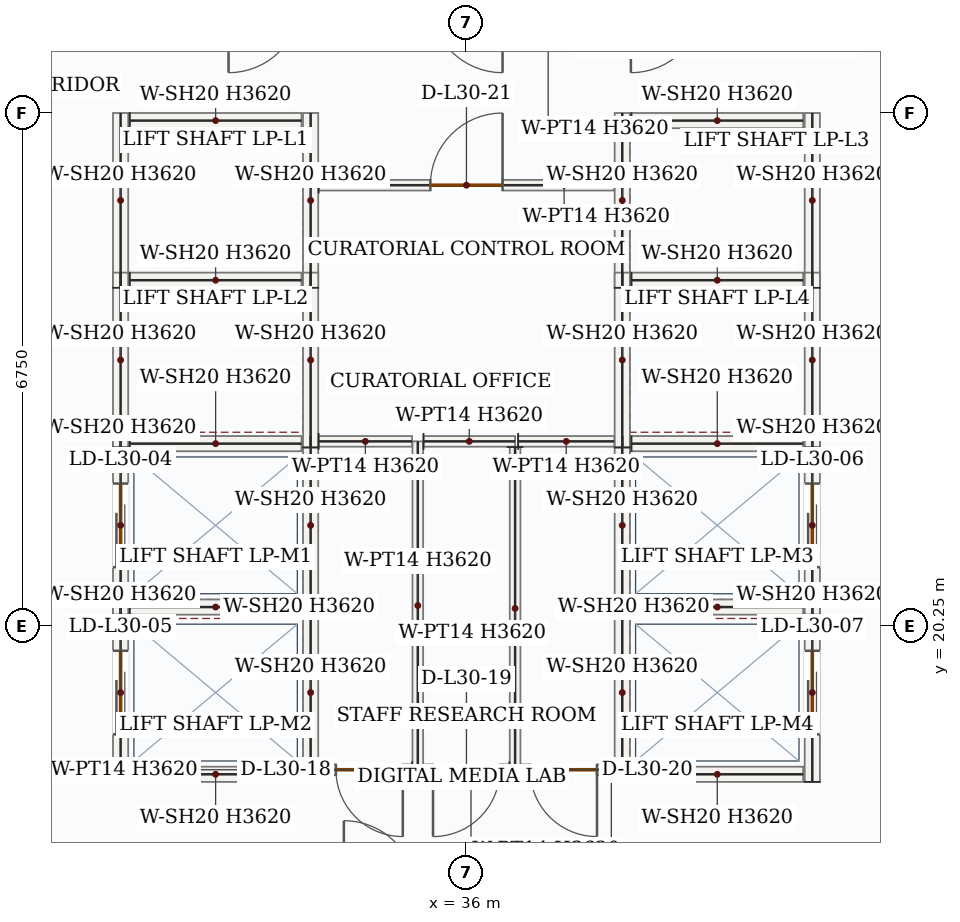
"""IFC4 building model, lengths in metres.
Left out: names, types, materials, properties, quantities, classifications, styles, units other than length and angle.
Written with IfcOpenShell. Run it as: python <this file> out.ifc"""

import sys

from ifc_helpers import new_model, si_unit, direction, frame, frame_2d, origin, place, context, subcontext, project, spatial, rectangle, extrude, source, transform, mapped, element, fill, save


model = new_model("IFC4")
c1 = context("Model", 3, precision=1e-05, world=origin(), true_north=direction((0.0, 1.0)))
c2 = subcontext(c1, "Body", "Model", "MODEL_VIEW")
j1 = project(units=[si_unit("LENGTHUNIT", "METRE"), si_unit("PLANEANGLEUNIT", "RADIAN")], contexts=[c1])
p1 = place(None, origin())
s1 = spatial("IfcSite", under=j1, at=p1, CompositionType="ELEMENT")
p2 = place(p1, origin())
s2 = spatial("IfcBuilding", under=s1, at=p2, CompositionType="ELEMENT")
p3 = place(p2, frame((0.0, 0.0, 135.6)))
s3 = spatial("IfcBuildingStorey", under=s2, at=p3, CompositionType="ELEMENT", Elevation=135.6)
p4 = place(p3, frame((31.45, 20.4, 0.0), z_axis=(0.0, 0.0, 1.0), x_axis=(0.0, 1.0, 0.0)))
e1 = element("IfcWall", 1, at=p4, inside=s3, PredefinedType="SOLIDWALL", context=c2, shape_type="SweptSolid", body=[
    extrude(rectangle(XDim=2.35, YDim=0.2, at=frame_2d((1.175, 0.0))), origin(), (0.0, 0.0, 1.0), 3.62),
])
p5 = place(p4, frame((0.625, 0.0, 0.0)))
e2 = element("IfcOpeningElement", 2, at=p5, cuts=e1, PredefinedType="OPENING", context=c2, shape_type="SweptSolid", body=[
    extrude(rectangle(XDim=1.1, YDim=2.15, at=frame_2d((0.55, 1.075))), frame((0.0, 0.11, 0.0), z_axis=(0.0, -1.0, 0.0), x_axis=(1.0, 0.0, 0.0)), (0.0, 0.0, 1.0), 0.22),
])
m1 = source(origin(), c2, "Body", "SweptSolid", [
    extrude(rectangle(XDim=2.35, YDim=0.2, at=frame_2d((1.175, 0.0))), origin(), (0.0, 0.0, 1.0), 3.62),
])
p6 = place(p3, frame((33.95, 20.4, 0.0), z_axis=(0.0, 0.0, 1.0), x_axis=(0.0, 1.0, 0.0)))
e3 = element("IfcWall", 3, at=p6, inside=s3, PredefinedType="SOLIDWALL", context=c2, shape_type="MappedRepresentation", body=[
    mapped(m1, transform((0.0, 0.0, 0.0), x_axis=(1.0, 0.0, 0.0), y_axis=(0.0, 1.0, 0.0), z_axis=(0.0, 0.0, 1.0), scale=1.0)),
])
m2 = source(origin(), c2, "Body", "SweptSolid", [
    extrude(rectangle(XDim=2.26, YDim=0.2, at=frame_2d((1.13, 0.0))), origin(), (0.0, 0.0, 1.0), 3.62),
])
for number, where, z_axis, x_axis in (
    (4, (31.57, 20.5, 0.0), (0.0, 0.0, 1.0), (1.0, 0.0, 0.0)),
    (5, (31.57, 22.65, 0.0), (0.0, 0.0, 1.0), (1.0, 0.0, 0.0)),
):
    element("IfcWall", number, at=place(p3, frame(where, z_axis=z_axis, x_axis=x_axis)), inside=s3, PredefinedType="SOLIDWALL", context=c2, shape_type="MappedRepresentation", body=[
        mapped(m2, transform((0.0, 0.0, 0.0), x_axis=(1.0, 0.0, 0.0), y_axis=(0.0, 1.0, 0.0), z_axis=(0.0, 0.0, 1.0), scale=1.0)),
    ])
p7 = place(p3, frame((31.45, 18.2, 0.0), z_axis=(0.0, 0.0, 1.0), x_axis=(0.0, 1.0, 0.0)))
e6 = element("IfcWall", 6, at=p7, inside=s3, PredefinedType="SOLIDWALL", context=c2, shape_type="SweptSolid", body=[
    extrude(rectangle(XDim=2.35, YDim=0.2, at=frame_2d((1.175, 0.0))), origin(), (0.0, 0.0, 1.0), 3.62),
])
p8 = place(p7, frame((0.625, 0.0, 0.0)))
e7 = element("IfcOpeningElement", 7, at=p8, cuts=e6, PredefinedType="OPENING", context=c2, shape_type="SweptSolid", body=[
    extrude(rectangle(XDim=1.1, YDim=2.15, at=frame_2d((0.55, 1.075))), frame((0.0, 0.11, 0.0), z_axis=(0.0, -1.0, 0.0), x_axis=(1.0, 0.0, 0.0)), (0.0, 0.0, 1.0), 0.22),
])
p9 = place(p3, frame((33.95, 18.2, 0.0), z_axis=(0.0, 0.0, 1.0), x_axis=(0.0, 1.0, 0.0)))
e8 = element("IfcWall", 8, at=p9, inside=s3, PredefinedType="SOLIDWALL", context=c2, shape_type="MappedRepresentation", body=[
    mapped(m1, transform((0.0, 0.0, 0.0), x_axis=(1.0, 0.0, 0.0), y_axis=(0.0, 1.0, 0.0), z_axis=(0.0, 0.0, 1.0), scale=1.0)),
])
p10 = place(p3, frame((31.57, 18.3, 0.0), z_axis=(0.0, 0.0, 1.0), x_axis=(1.0, 0.0, 0.0)))
e9 = element("IfcWall", 9, at=p10, inside=s3, PredefinedType="SOLIDWALL", context=c2, shape_type="MappedRepresentation", body=[
    mapped(m2, transform((0.0, 0.0, 0.0), x_axis=(1.0, 0.0, 0.0), y_axis=(0.0, 1.0, 0.0), z_axis=(0.0, 0.0, 1.0), scale=1.0)),
])
p11 = place(p3, frame((38.05, 20.4, 0.0), z_axis=(0.0, 0.0, 1.0), x_axis=(0.0, 1.0, 0.0)))
e10 = element("IfcWall", 10, at=p11, inside=s3, PredefinedType="SOLIDWALL", context=c2, shape_type="MappedRepresentation", body=[
    mapped(m1, transform((0.0, 0.0, 0.0), x_axis=(1.0, 0.0, 0.0), y_axis=(0.0, 1.0, 0.0), z_axis=(0.0, 0.0, 1.0), scale=1.0)),
])
p12 = place(p3, frame((40.55, 20.4, 0.0), z_axis=(0.0, 0.0, 1.0), x_axis=(0.0, 1.0, 0.0)))
e11 = element("IfcWall", 11, at=p12, inside=s3, PredefinedType="SOLIDWALL", context=c2, shape_type="SweptSolid", body=[
    extrude(rectangle(XDim=2.35, YDim=0.2, at=frame_2d((1.175, 0.0))), origin(), (0.0, 0.0, 1.0), 3.62),
])
p13 = place(p12, frame((0.625, 0.0, 0.0)))
e12 = element("IfcOpeningElement", 12, at=p13, cuts=e11, PredefinedType="OPENING", context=c2, shape_type="SweptSolid", body=[
    extrude(rectangle(XDim=1.1, YDim=2.15, at=frame_2d((0.55, 1.075))), frame((0.0, 0.11, 0.0), z_axis=(0.0, -1.0, 0.0), x_axis=(1.0, 0.0, 0.0)), (0.0, 0.0, 1.0), 0.22),
])
for number, where, z_axis, x_axis in (
    (13, (38.17, 20.5, 0.0), (0.0, 0.0, 1.0), (1.0, 0.0, 0.0)),
    (14, (38.17, 22.65, 0.0), (0.0, 0.0, 1.0), (1.0, 0.0, 0.0)),
):
    element("IfcWall", number, at=place(p3, frame(where, z_axis=z_axis, x_axis=x_axis)), inside=s3, PredefinedType="SOLIDWALL", context=c2, shape_type="MappedRepresentation", body=[
        mapped(m2, transform((0.0, 0.0, 0.0), x_axis=(1.0, 0.0, 0.0), y_axis=(0.0, 1.0, 0.0), z_axis=(0.0, 0.0, 1.0), scale=1.0)),
    ])
p14 = place(p3, frame((38.05, 18.2, 0.0), z_axis=(0.0, 0.0, 1.0), x_axis=(0.0, 1.0, 0.0)))
e15 = element("IfcWall", 15, at=p14, inside=s3, PredefinedType="SOLIDWALL", context=c2, shape_type="MappedRepresentation", body=[
    mapped(m1, transform((0.0, 0.0, 0.0), x_axis=(1.0, 0.0, 0.0), y_axis=(0.0, 1.0, 0.0), z_axis=(0.0, 0.0, 1.0), scale=1.0)),
])
p15 = place(p3, frame((40.55, 18.2, 0.0), z_axis=(0.0, 0.0, 1.0), x_axis=(0.0, 1.0, 0.0)))
e16 = element("IfcWall", 16, at=p15, inside=s3, PredefinedType="SOLIDWALL", context=c2, shape_type="SweptSolid", body=[
    extrude(rectangle(XDim=2.35, YDim=0.2, at=frame_2d((1.175, 0.0))), origin(), (0.0, 0.0, 1.0), 3.62),
])
p16 = place(p15, frame((0.625, 0.0, 0.0)))
e17 = element("IfcOpeningElement", 17, at=p16, cuts=e16, PredefinedType="OPENING", context=c2, shape_type="SweptSolid", body=[
    extrude(rectangle(XDim=1.1, YDim=2.15, at=frame_2d((0.55, 1.075))), frame((0.0, 0.11, 0.0), z_axis=(0.0, -1.0, 0.0), x_axis=(1.0, 0.0, 0.0)), (0.0, 0.0, 1.0), 0.22),
])
p17 = place(p3, frame((38.17, 18.3, 0.0), z_axis=(0.0, 0.0, 1.0), x_axis=(1.0, 0.0, 0.0)))
e18 = element("IfcWall", 18, at=p17, inside=s3, PredefinedType="SOLIDWALL", context=c2, shape_type="MappedRepresentation", body=[
    mapped(m2, transform((0.0, 0.0, 0.0), x_axis=(1.0, 0.0, 0.0), y_axis=(0.0, 1.0, 0.0), z_axis=(0.0, 0.0, 1.0), scale=1.0)),
])
m3 = source(origin(), c2, "Body", "SweptSolid", [
    extrude(rectangle(XDim=2.3, YDim=0.2, at=frame_2d((1.15, 0.0))), origin(), (0.0, 0.0, 1.0), 3.62),
])
for number, where, z_axis, x_axis in (
    (19, (31.45, 24.7, 0.0), (0.0, 0.0, 1.0), (0.0, 1.0, 0.0)),
    (20, (33.95, 24.7, 0.0), (0.0, 0.0, 1.0), (0.0, 1.0, 0.0)),
):
    element("IfcWall", number, at=place(p3, frame(where, z_axis=z_axis, x_axis=x_axis)), inside=s3, PredefinedType="SOLIDWALL", context=c2, shape_type="MappedRepresentation", body=[
        mapped(m3, transform((0.0, 0.0, 0.0), x_axis=(1.0, 0.0, 0.0), y_axis=(0.0, 1.0, 0.0), z_axis=(0.0, 0.0, 1.0), scale=1.0)),
    ])
for number, where, z_axis, x_axis in (
    (21, (31.57, 24.8, 0.0), (0.0, 0.0, 1.0), (1.0, 0.0, 0.0)),
    (22, (31.57, 26.9, 0.0), (0.0, 0.0, 1.0), (1.0, 0.0, 0.0)),
):
    element("IfcWall", number, at=place(p3, frame(where, z_axis=z_axis, x_axis=x_axis)), inside=s3, PredefinedType="SOLIDWALL", context=c2, shape_type="MappedRepresentation", body=[
        mapped(m2, transform((0.0, 0.0, 0.0), x_axis=(1.0, 0.0, 0.0), y_axis=(0.0, 1.0, 0.0), z_axis=(0.0, 0.0, 1.0), scale=1.0)),
    ])
m4 = source(origin(), c2, "Body", "SweptSolid", [
    extrude(rectangle(XDim=2.3, YDim=0.2, at=frame_2d((1.15, 0.0))), origin(), (0.0, 0.0, 1.0), 3.62),
])
for number, where, z_axis, x_axis in (
    (23, (31.45, 22.6, 0.0), (0.0, 0.0, 1.0), (0.0, 1.0, 0.0)),
    (24, (33.95, 22.6, 0.0), (0.0, 0.0, 1.0), (0.0, 1.0, 0.0)),
):
    element("IfcWall", number, at=place(p3, frame(where, z_axis=z_axis, x_axis=x_axis)), inside=s3, PredefinedType="SOLIDWALL", context=c2, shape_type="MappedRepresentation", body=[
        mapped(m4, transform((0.0, 0.0, 0.0), x_axis=(1.0, 0.0, 0.0), y_axis=(0.0, 1.0, 0.0), z_axis=(0.0, 0.0, 1.0), scale=1.0)),
    ])
for number, where, z_axis, x_axis in (
    (25, (38.05, 24.7, 0.0), (0.0, 0.0, 1.0), (0.0, 1.0, 0.0)),
    (26, (40.55, 24.7, 0.0), (0.0, 0.0, 1.0), (0.0, 1.0, 0.0)),
):
    element("IfcWall", number, at=place(p3, frame(where, z_axis=z_axis, x_axis=x_axis)), inside=s3, PredefinedType="SOLIDWALL", context=c2, shape_type="MappedRepresentation", body=[
        mapped(m3, transform((0.0, 0.0, 0.0), x_axis=(1.0, 0.0, 0.0), y_axis=(0.0, 1.0, 0.0), z_axis=(0.0, 0.0, 1.0), scale=1.0)),
    ])
for number, where, z_axis, x_axis in (
    (27, (38.17, 24.8, 0.0), (0.0, 0.0, 1.0), (1.0, 0.0, 0.0)),
    (28, (38.17, 26.9, 0.0), (0.0, 0.0, 1.0), (1.0, 0.0, 0.0)),
):
    element("IfcWall", number, at=place(p3, frame(where, z_axis=z_axis, x_axis=x_axis)), inside=s3, PredefinedType="SOLIDWALL", context=c2, shape_type="MappedRepresentation", body=[
        mapped(m2, transform((0.0, 0.0, 0.0), x_axis=(1.0, 0.0, 0.0), y_axis=(0.0, 1.0, 0.0), z_axis=(0.0, 0.0, 1.0), scale=1.0)),
    ])
for number, where, z_axis, x_axis in (
    (29, (38.05, 22.6, 0.0), (0.0, 0.0, 1.0), (0.0, 1.0, 0.0)),
    (30, (40.55, 22.6, 0.0), (0.0, 0.0, 1.0), (0.0, 1.0, 0.0)),
):
    element("IfcWall", number, at=place(p3, frame(where, z_axis=z_axis, x_axis=x_axis)), inside=s3, PredefinedType="SOLIDWALL", context=c2, shape_type="MappedRepresentation", body=[
        mapped(m4, transform((0.0, 0.0, 0.0), x_axis=(1.0, 0.0, 0.0), y_axis=(0.0, 1.0, 0.0), z_axis=(0.0, 0.0, 1.0), scale=1.0)),
    ])
m5 = source(origin(), c2, "Body", "SweptSolid", [
    extrude(rectangle(XDim=4.32, YDim=0.14, at=frame_2d((2.16, 0.0))), origin(), (0.0, 0.0, 1.0), 3.62),
])
p18 = place(p3, frame((35.36, 18.36, 0.0), z_axis=(0.0, 0.0, 1.0), x_axis=(0.0, 1.0, 0.0)))
e31 = element("IfcWall", 31, at=p18, inside=s3, PredefinedType="PARTITIONING", context=c2, shape_type="MappedRepresentation", body=[
    mapped(m5, transform((0.0, 0.0, 0.0), x_axis=(1.0, 0.0, 0.0), y_axis=(0.0, 1.0, 0.0), z_axis=(0.0, 0.0, 1.0), scale=1.0)),
])
m6 = source(origin(), c2, "Body", "SweptSolid", [
    extrude(rectangle(XDim=1.205, YDim=0.14, at=frame_2d((0.603, 0.0))), origin(), (0.0, 0.0, 1.0), 3.62),
])
p19 = place(p3, frame((35.435, 22.68, 0.0), z_axis=(0.0, 0.0, 1.0), x_axis=(1.0, 0.0, 0.0)))
e32 = element("IfcWall", 32, at=p19, inside=s3, PredefinedType="PARTITIONING", context=c2, shape_type="MappedRepresentation", body=[
    mapped(m6, transform((0.0, 0.0, 0.0), x_axis=(1.0, 0.0, 0.0), y_axis=(0.0, 1.0, 0.0), z_axis=(0.0, 0.0, 1.0), scale=1.0)),
])
m7 = source(origin(), c2, "Body", "SweptSolid", [
    extrude(rectangle(XDim=4.245, YDim=0.14, at=frame_2d((2.123, 0.0))), origin(), (0.0, 0.0, 1.0), 3.62),
])
p20 = place(p3, frame((36.64, 22.605, 0.0), z_axis=(0.0, 0.0, 1.0), x_axis=(0.0, -1.0, 0.0)))
e33 = element("IfcWall", 33, at=p20, inside=s3, PredefinedType="PARTITIONING", context=c2, shape_type="MappedRepresentation", body=[
    mapped(m7, transform((0.0, 0.0, 0.0), x_axis=(1.0, 0.0, 0.0), y_axis=(0.0, 1.0, 0.0), z_axis=(0.0, 0.0, 1.0), scale=1.0)),
])
p21 = place(p3, frame((36.565, 18.36, 0.0), z_axis=(0.0, 0.0, 1.0), x_axis=(-1.0, 0.0, 0.0)))
e34 = element("IfcWall", 34, at=p21, inside=s3, PredefinedType="PARTITIONING", context=c2, shape_type="SweptSolid", body=[
    extrude(rectangle(XDim=1.13, YDim=0.14, at=frame_2d((0.565, 0.0))), origin(), (0.0, 0.0, 1.0), 3.62),
])
p22 = place(p21, frame((0.125, 0.0, 0.0)))
e35 = element("IfcOpeningElement", 35, at=p22, cuts=e34, PredefinedType="OPENING", context=c2, shape_type="SweptSolid", body=[
    extrude(rectangle(XDim=0.88, YDim=2.1, at=frame_2d((0.44, 1.05))), frame((0.0, 0.08, 0.0), z_axis=(0.0, -1.0, 0.0), x_axis=(1.0, 0.0, 0.0)), (0.0, 0.0, 1.0), 0.16),
])
m8 = source(origin(), c2, "Body", "SweptSolid", [
    extrude(rectangle(XDim=1.23, YDim=0.14, at=frame_2d((0.615, 0.0))), origin(), (0.0, 0.0, 1.0), 3.62),
])
p23 = place(p3, frame((34.055, 22.68, 0.0), z_axis=(0.0, 0.0, 1.0), x_axis=(1.0, 0.0, 0.0)))
e36 = element("IfcWall", 36, at=p23, inside=s3, PredefinedType="PARTITIONING", context=c2, shape_type="MappedRepresentation", body=[
    mapped(m8, transform((0.0, 0.0, 0.0), x_axis=(1.0, 0.0, 0.0), y_axis=(0.0, 1.0, 0.0), z_axis=(0.0, 0.0, 1.0), scale=1.0)),
])
p24 = place(p3, frame((35.285, 18.36, 0.0), z_axis=(0.0, 0.0, 1.0), x_axis=(-1.0, 0.0, 0.0)))
e37 = element("IfcWall", 37, at=p24, inside=s3, PredefinedType="PARTITIONING", context=c2, shape_type="SweptSolid", body=[
    extrude(rectangle(XDim=1.23, YDim=0.14, at=frame_2d((0.615, 0.0))), origin(), (0.0, 0.0, 1.0), 3.62),
])
p25 = place(p24, frame((0.123, 0.0, 0.0)))
e38 = element("IfcOpeningElement", 38, at=p25, cuts=e37, PredefinedType="OPENING", context=c2, shape_type="SweptSolid", body=[
    extrude(rectangle(XDim=0.88, YDim=2.1, at=frame_2d((0.44, 1.05))), frame((0.0, 0.08, 0.0), z_axis=(0.0, -1.0, 0.0), x_axis=(1.0, 0.0, 0.0)), (0.0, 0.0, 1.0), 0.16),
])
m9 = source(origin(), c2, "Body", "SweptSolid", [
    extrude(rectangle(XDim=1.265, YDim=0.14, at=frame_2d((0.633, 0.0))), origin(), (0.0, 0.0, 1.0), 3.62),
])
p26 = place(p3, frame((36.68, 22.68, 0.0), z_axis=(0.0, 0.0, 1.0), x_axis=(1.0, 0.0, 0.0)))
e39 = element("IfcWall", 39, at=p26, inside=s3, PredefinedType="PARTITIONING", context=c2, shape_type="MappedRepresentation", body=[
    mapped(m9, transform((0.0, 0.0, 0.0), x_axis=(1.0, 0.0, 0.0), y_axis=(0.0, 1.0, 0.0), z_axis=(0.0, 0.0, 1.0), scale=1.0)),
])
p27 = place(p3, frame((37.945, 18.36, 0.0), z_axis=(0.0, 0.0, 1.0), x_axis=(-1.0, 0.0, 0.0)))
e40 = element("IfcWall", 40, at=p27, inside=s3, PredefinedType="PARTITIONING", context=c2, shape_type="SweptSolid", body=[
    extrude(rectangle(XDim=1.23, YDim=0.14, at=frame_2d((0.615, 0.0))), origin(), (0.0, 0.0, 1.0), 3.62),
])
p28 = place(p27, frame((0.228, 0.0, 0.0)))
e41 = element("IfcOpeningElement", 41, at=p28, cuts=e40, PredefinedType="OPENING", context=c2, shape_type="SweptSolid", body=[
    extrude(rectangle(XDim=0.88, YDim=2.1, at=frame_2d((0.44, 1.05))), frame((0.0, 0.08, 0.0), z_axis=(0.0, -1.0, 0.0), x_axis=(1.0, 0.0, 0.0)), (0.0, 0.0, 1.0), 0.16),
])
p29 = place(p3, frame((34.055, 26.05, 0.0), z_axis=(0.0, 0.0, 1.0), x_axis=(1.0, 0.0, 0.0)))
e42 = element("IfcWall", 42, at=p29, inside=s3, PredefinedType="PARTITIONING", context=c2, shape_type="SweptSolid", body=[
    extrude(rectangle(XDim=3.89, YDim=0.14, at=frame_2d((1.945, 0.0))), origin(), (0.0, 0.0, 1.0), 3.62),
])
p30 = place(p29, frame((1.47, 0.0, 0.0)))
e43 = element("IfcOpeningElement", 43, at=p30, cuts=e42, PredefinedType="OPENING", context=c2, shape_type="SweptSolid", body=[
    extrude(rectangle(XDim=0.95, YDim=2.15, at=frame_2d((0.475, 1.075))), frame((0.0, 0.08, 0.0), z_axis=(0.0, -1.0, 0.0), x_axis=(1.0, 0.0, 0.0)), (0.0, 0.0, 1.0), 0.16),
])
m10 = source(origin(), c2, "Body", "SweptSolid", [
    extrude(rectangle(XDim=1.1, YDim=2.15, at=frame_2d((0.55, 1.075))), frame((0.0, 0.025, 0.0), z_axis=(0.0, -1.0, 0.0), x_axis=(1.0, 0.0, 0.0)), (0.0, 0.0, 1.0), 0.05),
])
p31 = place(p5, origin())
e44 = element("IfcDoor", 44, at=p31, inside=s3, OperationType="DOUBLE_DOOR_SLIDING", PredefinedType="DOOR", context=c2, shape_type="MappedRepresentation", body=[
    mapped(m10, transform((0.0, 0.0, 0.0), x_axis=(1.0, 0.0, 0.0), y_axis=(0.0, 1.0, 0.0), z_axis=(0.0, 0.0, 1.0), scale=1.0)),
])
fill(e2, e44)
p32 = place(p8, origin())
e45 = element("IfcDoor", 45, at=p32, inside=s3, OperationType="DOUBLE_DOOR_SLIDING", PredefinedType="DOOR", context=c2, shape_type="MappedRepresentation", body=[
    mapped(m10, transform((0.0, 0.0, 0.0), x_axis=(1.0, 0.0, 0.0), y_axis=(0.0, 1.0, 0.0), z_axis=(0.0, 0.0, 1.0), scale=1.0)),
])
fill(e7, e45)
p33 = place(p13, origin())
e46 = element("IfcDoor", 46, at=p33, inside=s3, OperationType="DOUBLE_DOOR_SLIDING", PredefinedType="DOOR", context=c2, shape_type="MappedRepresentation", body=[
    mapped(m10, transform((0.0, 0.0, 0.0), x_axis=(1.0, 0.0, 0.0), y_axis=(0.0, 1.0, 0.0), z_axis=(0.0, 0.0, 1.0), scale=1.0)),
])
fill(e12, e46)
p34 = place(p16, origin())
e47 = element("IfcDoor", 47, at=p34, inside=s3, OperationType="DOUBLE_DOOR_SLIDING", PredefinedType="DOOR", context=c2, shape_type="MappedRepresentation", body=[
    mapped(m10, transform((0.0, 0.0, 0.0), x_axis=(1.0, 0.0, 0.0), y_axis=(0.0, 1.0, 0.0), z_axis=(0.0, 0.0, 1.0), scale=1.0)),
])
fill(e17, e47)
m11 = source(origin(), c2, "Body", "SweptSolid", [
    extrude(rectangle(XDim=0.88, YDim=2.1, at=frame_2d((0.44, 1.05))), frame((0.0, 0.025, 0.0), z_axis=(0.0, -1.0, 0.0), x_axis=(1.0, 0.0, 0.0)), (0.0, 0.0, 1.0), 0.05),
])
p35 = place(p25, origin())
e48 = element("IfcDoor", 48, at=p35, inside=s3, OperationType="SINGLE_SWING_LEFT", PredefinedType="DOOR", context=c2, shape_type="MappedRepresentation", body=[
    mapped(m11, transform((0.0, 0.0, 0.0), x_axis=(1.0, 0.0, 0.0), y_axis=(0.0, 1.0, 0.0), z_axis=(0.0, 0.0, 1.0), scale=1.0)),
])
fill(e38, e48)
p36 = place(p22, origin())
e49 = element("IfcDoor", 49, at=p36, inside=s3, OperationType="SINGLE_SWING_RIGHT", PredefinedType="DOOR", context=c2, shape_type="MappedRepresentation", body=[
    mapped(m11, transform((0.0, 0.0, 0.0), x_axis=(1.0, 0.0, 0.0), y_axis=(0.0, 1.0, 0.0), z_axis=(0.0, 0.0, 1.0), scale=1.0)),
])
fill(e35, e49)
p37 = place(p28, origin())
e50 = element("IfcDoor", 50, at=p37, inside=s3, OperationType="SINGLE_SWING_LEFT", PredefinedType="DOOR", context=c2, shape_type="MappedRepresentation", body=[
    mapped(m11, transform((0.0, 0.0, 0.0), x_axis=(1.0, 0.0, 0.0), y_axis=(0.0, 1.0, 0.0), z_axis=(0.0, 0.0, 1.0), scale=1.0)),
])
fill(e41, e50)
m12 = source(origin(), c2, "Body", "SweptSolid", [
    extrude(rectangle(XDim=0.95, YDim=2.15, at=frame_2d((0.475, 1.075))), frame((0.0, 0.025, 0.0), z_axis=(0.0, -1.0, 0.0), x_axis=(1.0, 0.0, 0.0)), (0.0, 0.0, 1.0), 0.05),
])
p38 = place(p30, origin())
e51 = element("IfcDoor", 51, at=p38, inside=s3, OperationType="SINGLE_SWING_RIGHT", PredefinedType="DOOR", context=c2, shape_type="MappedRepresentation", body=[
    mapped(m12, transform((0.0, 0.0, 0.0), x_axis=(1.0, 0.0, 0.0), y_axis=(0.0, 1.0, 0.0), z_axis=(0.0, 0.0, 1.0), scale=1.0)),
])
fill(e43, e51)
save(model, sys.argv[1])
